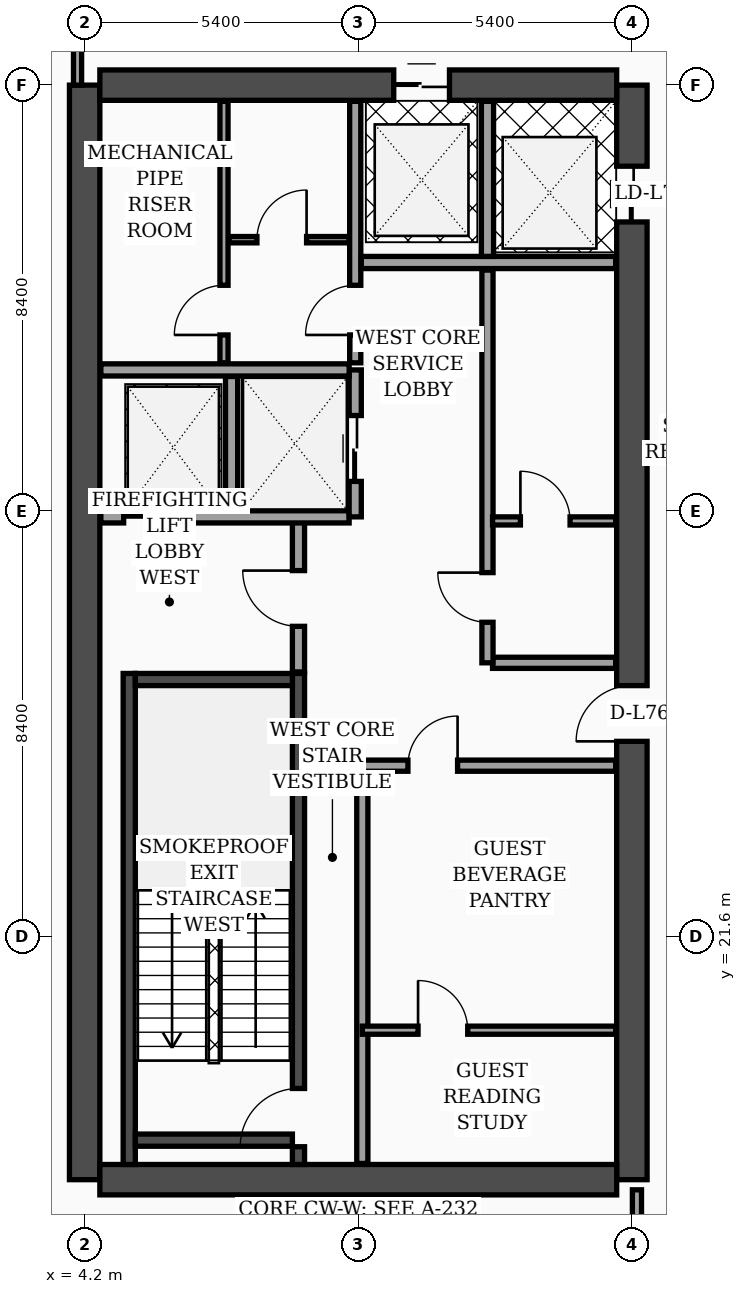
"""IFC4 building model, lengths in metres.
Left out: names, types, materials, properties, quantities, classifications, styles, units other than length and angle.
Written with IfcOpenShell. Run it as: python <this file> out.ifc"""

import sys

from ifc_helpers import new_model, si_unit, direction, frame, frame_2d, origin, place, context, subcontext, project, spatial, rectangle, extrude, element, fill, save


model = new_model("IFC4")
c1 = context("Model", 3, precision=1e-05, world=origin(), true_north=direction((0.0, 1.0)))
c2 = subcontext(c1, "Body", "Model", "MODEL_VIEW")
j1 = project(units=[si_unit("LENGTHUNIT", "METRE"), si_unit("PLANEANGLEUNIT", "RADIAN")], contexts=[c1])
p1 = place(None, origin())
s1 = spatial("IfcSite", under=j1, at=p1, CompositionType="ELEMENT")
p2 = place(p1, origin())
s2 = spatial("IfcBuilding", under=s1, at=p2, CompositionType="ELEMENT")
p3 = place(p2, frame((0.0, 0.0, 307.0)))
s3 = spatial("IfcBuildingStorey", under=s2, at=p3, CompositionType="ELEMENT", Elevation=307.0)
p4 = place(p3, frame((4.2, 16.8, 0.0), z_axis=(0.0, 0.0, 1.0), x_axis=(0.0, 1.0, 0.0)))
e1 = element("IfcWall", 1, at=p4, inside=s3, PredefinedType="SHEAR", context=c2, shape_type="SweptSolid", body=[
    extrude(rectangle(XDim=21.6, YDim=0.6, at=frame_2d((10.8, 0.0))), origin(), (0.0, 0.0, 1.0), 4.26),
])
p5 = place(p3, frame((15.0, 16.8, 0.0), z_axis=(0.0, 0.0, 1.0), x_axis=(0.0, 1.0, 0.0)))
e2 = element("IfcWall", 2, at=p5, inside=s3, PredefinedType="SHEAR", context=c2, shape_type="SweptSolid", body=[
    extrude(rectangle(XDim=21.6, YDim=0.6, at=frame_2d((10.8, 0.0))), origin(), (0.0, 0.0, 1.0), 4.26),
])
p6 = place(p5, frame((8.65, 0.0, 0.0)))
e3 = element("IfcOpeningElement", 3, at=p6, cuts=e2, PredefinedType="OPENING", context=c2, shape_type="SweptSolid", body=[
    extrude(rectangle(XDim=1.1, YDim=2.2, at=frame_2d((0.55, 1.1))), frame((0.0, 0.31, 0.0), z_axis=(0.0, -1.0, 0.0), x_axis=(1.0, 0.0, 0.0)), (0.0, 0.0, 1.0), 0.62),
])
p7 = place(p5, frame((18.9, 0.0, 0.0)))
e4 = element("IfcOpeningElement", 4, at=p7, cuts=e2, PredefinedType="OPENING", context=c2, shape_type="SweptSolid", body=[
    extrude(rectangle(XDim=1.1, YDim=2.2, at=frame_2d((0.55, 1.1))), frame((0.0, 0.31, 0.0), z_axis=(0.0, -1.0, 0.0), x_axis=(1.0, 0.0, 0.0)), (0.0, 0.0, 1.0), 0.62),
])
p8 = place(p3, frame((4.5, 38.4, 0.0), z_axis=(0.0, 0.0, 1.0), x_axis=(1.0, 0.0, 0.0)))
e5 = element("IfcWall", 5, at=p8, inside=s3, PredefinedType="SHEAR", context=c2, shape_type="SweptSolid", body=[
    extrude(rectangle(XDim=10.2, YDim=0.6, at=frame_2d((5.1, 0.0))), origin(), (0.0, 0.0, 1.0), 4.26),
])
p9 = place(p8, frame((5.8, 0.0, 0.0)))
e6 = element("IfcOpeningElement", 6, at=p9, cuts=e5, PredefinedType="OPENING", context=c2, shape_type="SweptSolid", body=[
    extrude(rectangle(XDim=1.1, YDim=2.2, at=frame_2d((0.55, 1.1))), frame((0.0, 0.31, 0.0), z_axis=(0.0, -1.0, 0.0), x_axis=(1.0, 0.0, 0.0)), (0.0, 0.0, 1.0), 0.62),
])
p10 = place(p3, frame((4.5, 16.8, 0.0), z_axis=(0.0, 0.0, 1.0), x_axis=(1.0, 0.0, 0.0)))
e7 = element("IfcWall", 7, at=p10, inside=s3, PredefinedType="SHEAR", context=c2, shape_type="SweptSolid", body=[
    extrude(rectangle(XDim=10.2, YDim=0.6, at=frame_2d((5.1, 0.0))), origin(), (0.0, 0.0, 1.0), 4.26),
])
p11 = place(p3, frame((5.08, 17.1, 0.0), z_axis=(0.0, 0.0, 1.0), x_axis=(0.0, 1.0, 0.0)))
e8 = element("IfcWall", 8, at=p11, inside=s3, PredefinedType="SOLIDWALL", context=c2, shape_type="SweptSolid", body=[
    extrude(rectangle(XDim=9.69, YDim=0.24, at=frame_2d((4.845, 0.0))), origin(), (0.0, 0.0, 1.0), 4.26),
])
p12 = place(p3, frame((8.42, 17.1, 0.0), z_axis=(0.0, 0.0, 1.0), x_axis=(0.0, 1.0, 0.0)))
e9 = element("IfcWall", 9, at=p12, inside=s3, PredefinedType="SOLIDWALL", context=c2, shape_type="SweptSolid", body=[
    extrude(rectangle(XDim=9.69, YDim=0.24, at=frame_2d((4.845, 0.0))), origin(), (0.0, 0.0, 1.0), 4.26),
])
p13 = place(p12, frame((0.35, 0.0, 0.0)))
e10 = element("IfcOpeningElement", 10, at=p13, cuts=e9, PredefinedType="OPENING", context=c2, shape_type="SweptSolid", body=[
    extrude(rectangle(XDim=1.15, YDim=2.2, at=frame_2d((0.575, 1.1))), frame((0.0, 0.13, 0.0), z_axis=(0.0, -1.0, 0.0), x_axis=(1.0, 0.0, 0.0)), (0.0, 0.0, 1.0), 0.26),
])
for number, where, z_axis, x_axis in (
    (11, (5.2, 17.58, 0.0), (0.0, 0.0, 1.0), (1.0, 0.0, 0.0)),
    (12, (5.2, 26.67, 0.0), (0.0, 0.0, 1.0), (1.0, 0.0, 0.0)),
):
    element("IfcWall", number, at=place(p3, frame(where, z_axis=z_axis, x_axis=x_axis)), inside=s3, PredefinedType="SOLIDWALL", context=c2, shape_type="SweptSolid", body=[
        extrude(rectangle(XDim=3.1, YDim=0.24, at=frame_2d((1.55, 0.0))), origin(), (0.0, 0.0, 1.0), 4.26),
    ])
p14 = place(p3, frame((8.42, 26.82, 0.0), z_axis=(0.0, 0.0, 1.0), x_axis=(0.0, 1.0, 0.0)))
e13 = element("IfcWall", 13, at=p14, inside=s3, PredefinedType="SOLIDWALL", context=c2, shape_type="SweptSolid", body=[
    extrude(rectangle(XDim=3.0, YDim=0.24, at=frame_2d((1.5, 0.0))), origin(), (0.0, 0.0, 1.0), 4.26),
])
p15 = place(p14, frame((0.9, 0.0, 0.0)))
e14 = element("IfcOpeningElement", 14, at=p15, cuts=e13, PredefinedType="OPENING", context=c2, shape_type="SweptSolid", body=[
    extrude(rectangle(XDim=1.1, YDim=2.2, at=frame_2d((0.55, 1.1))), frame((0.0, 0.13, 0.0), z_axis=(0.0, -1.0, 0.0), x_axis=(1.0, 0.0, 0.0)), (0.0, 0.0, 1.0), 0.26),
])
p16 = place(p3, frame((4.52, 29.88, 0.0), z_axis=(0.0, 0.0, 1.0), x_axis=(1.0, 0.0, 0.0)))
e15 = element("IfcWall", 15, at=p16, inside=s3, PredefinedType="SOLIDWALL", context=c2, shape_type="SweptSolid", body=[
    extrude(rectangle(XDim=4.9, YDim=0.24, at=frame_2d((2.45, 0.0))), origin(), (0.0, 0.0, 1.0), 4.26),
])
p17 = place(p16, frame((0.45, 0.0, 0.0)))
e16 = element("IfcOpeningElement", 16, at=p17, cuts=e15, PredefinedType="OPENING", context=c2, shape_type="SweptSolid", body=[
    extrude(rectangle(XDim=1.3, YDim=2.35, at=frame_2d((0.65, 1.175))), frame((0.0, 0.13, 0.0), z_axis=(0.0, -1.0, 0.0), x_axis=(1.0, 0.0, 0.0)), (0.0, 0.0, 1.0), 0.26),
])
p18 = place(p3, frame((7.1, 30.02, 0.0), z_axis=(0.0, 0.0, 1.0), x_axis=(0.0, 1.0, 0.0)))
e17 = element("IfcWall", 17, at=p18, inside=s3, PredefinedType="SOLIDWALL", context=c2, shape_type="SweptSolid", body=[
    extrude(rectangle(XDim=2.63, YDim=0.24, at=frame_2d((1.315, 0.0))), origin(), (0.0, 0.0, 1.0), 4.26),
])
p19 = place(p3, frame((9.54, 29.88, 0.0), z_axis=(0.0, 0.0, 1.0), x_axis=(0.0, 1.0, 0.0)))
e18 = element("IfcWall", 18, at=p19, inside=s3, PredefinedType="SOLIDWALL", context=c2, shape_type="SweptSolid", body=[
    extrude(rectangle(XDim=2.9, YDim=0.24, at=frame_2d((1.45, 0.0))), origin(), (0.0, 0.0, 1.0), 4.26),
])
p20 = place(p19, frame((0.7, 0.0, 0.0)))
e19 = element("IfcOpeningElement", 19, at=p20, cuts=e18, PredefinedType="OPENING", context=c2, shape_type="SweptSolid", body=[
    extrude(rectangle(XDim=1.3, YDim=2.35, at=frame_2d((0.65, 1.175))), frame((0.0, 0.13, 0.0), z_axis=(0.0, -1.0, 0.0), x_axis=(1.0, 0.0, 0.0)), (0.0, 0.0, 1.0), 0.26),
])
p21 = place(p3, frame((4.52, 32.78, 0.0), z_axis=(0.0, 0.0, 1.0), x_axis=(1.0, 0.0, 0.0)))
e20 = element("IfcWall", 20, at=p21, inside=s3, PredefinedType="SOLIDWALL", context=c2, shape_type="SweptSolid", body=[
    extrude(rectangle(XDim=4.9, YDim=0.24, at=frame_2d((2.45, 0.0))), origin(), (0.0, 0.0, 1.0), 3.89),
])
p22 = place(p3, frame((9.68, 17.12, 0.0), z_axis=(0.0, 0.0, 1.0), x_axis=(0.0, 1.0, 0.0)))
e21 = element("IfcWall", 21, at=p22, inside=s3, PredefinedType="SOLIDWALL", context=c2, shape_type="SweptSolid", body=[
    extrude(rectangle(XDim=7.88, YDim=0.22, at=frame_2d((3.94, 0.0))), origin(), (0.0, 0.0, 1.0), 4.26),
])
p23 = place(p3, frame((6.95, 32.92, 0.0), z_axis=(0.0, 0.0, 1.0), x_axis=(0.0, 1.0, 0.0)))
e22 = element("IfcWall", 22, at=p23, inside=s3, PredefinedType="PARTITIONING", context=c2, shape_type="SweptSolid", body=[
    extrude(rectangle(XDim=5.16, YDim=0.16, at=frame_2d((2.58, 0.0))), origin(), (0.0, 0.0, 1.0), 4.26),
])
p24 = place(p23, frame((0.55, 0.0, 0.0)))
e23 = element("IfcOpeningElement", 23, at=p24, cuts=e22, PredefinedType="OPENING", context=c2, shape_type="SweptSolid", body=[
    extrude(rectangle(XDim=0.98, YDim=2.15, at=frame_2d((0.49, 1.075))), frame((0.0, 0.09, 0.0), z_axis=(0.0, -1.0, 0.0), x_axis=(1.0, 0.0, 0.0)), (0.0, 0.0, 1.0), 0.18),
])
p25 = place(p3, frame((7.05, 35.35, 0.0), z_axis=(0.0, 0.0, 1.0), x_axis=(1.0, 0.0, 0.0)))
e24 = element("IfcWall", 24, at=p25, inside=s3, PredefinedType="PARTITIONING", context=c2, shape_type="SweptSolid", body=[
    extrude(rectangle(XDim=2.37, YDim=0.125, at=frame_2d((1.185, 0.0))), origin(), (0.0, 0.0, 1.0), 4.26),
])
p26 = place(p25, frame((0.55, 0.0, 0.0)))
e25 = element("IfcOpeningElement", 25, at=p26, cuts=e24, PredefinedType="OPENING", context=c2, shape_type="SweptSolid", body=[
    extrude(rectangle(XDim=0.98, YDim=2.15, at=frame_2d((0.49, 1.075))), frame((0.0, 0.073, 0.0), z_axis=(0.0, -1.0, 0.0), x_axis=(1.0, 0.0, 0.0)), (0.0, 0.0, 1.0), 0.145),
])
p27 = place(p3, frame((9.54, 32.92, 0.0), z_axis=(0.0, 0.0, 1.0), x_axis=(0.0, 1.0, 0.0)))
e26 = element("IfcWall", 26, at=p27, inside=s3, PredefinedType="SOLIDWALL", context=c2, shape_type="SweptSolid", body=[
    extrude(rectangle(XDim=5.16, YDim=0.22, at=frame_2d((2.58, 0.0))), origin(), (0.0, 0.0, 1.0), 4.26),
])
p28 = place(p27, frame((0.55, 0.0, 0.0)))
e27 = element("IfcOpeningElement", 27, at=p28, cuts=e26, PredefinedType="OPENING", context=c2, shape_type="SweptSolid", body=[
    extrude(rectangle(XDim=0.98, YDim=2.15, at=frame_2d((0.49, 1.075))), frame((0.0, 0.12, 0.0), z_axis=(0.0, -1.0, 0.0), x_axis=(1.0, 0.0, 0.0)), (0.0, 0.0, 1.0), 0.24),
])
p29 = place(p3, frame((9.68, 19.75, 0.0), z_axis=(0.0, 0.0, 1.0), x_axis=(1.0, 0.0, 0.0)))
e28 = element("IfcWall", 28, at=p29, inside=s3, PredefinedType="PARTITIONING", context=c2, shape_type="SweptSolid", body=[
    extrude(rectangle(XDim=5.0, YDim=0.16, at=frame_2d((2.5, 0.0))), origin(), (0.0, 0.0, 1.0), 4.26),
])
p30 = place(p29, frame((1.1, 0.0, 0.0)))
e29 = element("IfcOpeningElement", 29, at=p30, cuts=e28, PredefinedType="OPENING", context=c2, shape_type="SweptSolid", body=[
    extrude(rectangle(XDim=0.98, YDim=2.15, at=frame_2d((0.49, 1.075))), frame((0.0, 0.09, 0.0), z_axis=(0.0, -1.0, 0.0), x_axis=(1.0, 0.0, 0.0)), (0.0, 0.0, 1.0), 0.18),
])
p31 = place(p3, frame((9.68, 24.97, 0.0), z_axis=(0.0, 0.0, 1.0), x_axis=(1.0, 0.0, 0.0)))
e30 = element("IfcWall", 30, at=p31, inside=s3, PredefinedType="SOLIDWALL", context=c2, shape_type="SweptSolid", body=[
    extrude(rectangle(XDim=5.0, YDim=0.22, at=frame_2d((2.5, 0.0))), origin(), (0.0, 0.0, 1.0), 3.69),
])
p32 = place(p31, frame((0.9, 0.0, 0.0)))
e31 = element("IfcOpeningElement", 31, at=p32, cuts=e30, PredefinedType="OPENING", context=c2, shape_type="SweptSolid", body=[
    extrude(rectangle(XDim=0.98, YDim=2.15, at=frame_2d((0.49, 1.075))), frame((0.0, 0.12, 0.0), z_axis=(0.0, -1.0, 0.0), x_axis=(1.0, 0.0, 0.0)), (0.0, 0.0, 1.0), 0.24),
])
p33 = place(p3, frame((12.25, 27.0, 0.0), z_axis=(0.0, 0.0, 1.0), x_axis=(1.0, 0.0, 0.0)))
e32 = element("IfcWall", 32, at=p33, inside=s3, PredefinedType="SOLIDWALL", context=c2, shape_type="SweptSolid", body=[
    extrude(rectangle(XDim=2.43, YDim=0.22, at=frame_2d((1.215, 0.0))), origin(), (0.0, 0.0, 1.0), 4.26),
])
p34 = place(p3, frame((12.15, 27.0, 0.0), z_axis=(0.0, 0.0, 1.0), x_axis=(0.0, 1.0, 0.0)))
e33 = element("IfcWall", 33, at=p34, inside=s3, PredefinedType="SOLIDWALL", context=c2, shape_type="SweptSolid", body=[
    extrude(rectangle(XDim=7.75, YDim=0.22, at=frame_2d((3.875, 0.0))), origin(), (0.0, 0.0, 1.0), 4.26),
])
p35 = place(p34, frame((0.8, 0.0, 0.0)))
e34 = element("IfcOpeningElement", 34, at=p35, cuts=e33, PredefinedType="OPENING", context=c2, shape_type="SweptSolid", body=[
    extrude(rectangle(XDim=0.98, YDim=2.15, at=frame_2d((0.49, 1.075))), frame((0.0, 0.12, 0.0), z_axis=(0.0, -1.0, 0.0), x_axis=(1.0, 0.0, 0.0)), (0.0, 0.0, 1.0), 0.24),
])
p36 = place(p3, frame((12.25, 29.8, 0.0), z_axis=(0.0, 0.0, 1.0), x_axis=(1.0, 0.0, 0.0)))
e35 = element("IfcWall", 35, at=p36, inside=s3, PredefinedType="PARTITIONING", context=c2, shape_type="SweptSolid", body=[
    extrude(rectangle(XDim=2.43, YDim=0.16, at=frame_2d((1.215, 0.0))), origin(), (0.0, 0.0, 1.0), 4.26),
])
p37 = place(p36, frame((0.55, 0.0, 0.0)))
e36 = element("IfcOpeningElement", 36, at=p37, cuts=e35, PredefinedType="OPENING", context=c2, shape_type="SweptSolid", body=[
    extrude(rectangle(XDim=0.98, YDim=2.15, at=frame_2d((0.49, 1.075))), frame((0.0, 0.09, 0.0), z_axis=(0.0, -1.0, 0.0), x_axis=(1.0, 0.0, 0.0)), (0.0, 0.0, 1.0), 0.18),
])
p38 = place(p3, frame((9.66, 34.9, 0.0), z_axis=(0.0, 0.0, 1.0), x_axis=(1.0, 0.0, 0.0)))
e37 = element("IfcWall", 37, at=p38, inside=s3, PredefinedType="SOLIDWALL", context=c2, shape_type="SweptSolid", body=[
    extrude(rectangle(XDim=5.02, YDim=0.24, at=frame_2d((2.51, 0.0))), origin(), (0.0, 0.0, 1.0), 4.26),
])
p39 = place(p3, frame((12.15, 35.02, 0.0), z_axis=(0.0, 0.0, 1.0), x_axis=(0.0, 1.0, 0.0)))
e38 = element("IfcWall", 38, at=p39, inside=s3, PredefinedType="SOLIDWALL", context=c2, shape_type="SweptSolid", body=[
    extrude(rectangle(XDim=3.06, YDim=0.24, at=frame_2d((1.53, 0.0))), origin(), (0.0, 0.0, 1.0), 4.26),
])
p40 = place(p3, frame((4.06, 38.4, 0.0), z_axis=(0.0, 0.0, 1.0), x_axis=(0.0, 1.0, 0.0)))
e39 = element("IfcWall", 39, at=p40, inside=s3, PredefinedType="PARTITIONING", context=c2, shape_type="SweptSolid", body=[
    extrude(rectangle(XDim=5.5, YDim=0.16, at=frame_2d((2.75, 0.0))), origin(), (0.0, 0.0, 1.0), 3.69),
])
p41 = place(p40, frame((3.2, 0.0, 0.0)))
e40 = element("IfcOpeningElement", 40, at=p41, cuts=e39, PredefinedType="OPENING", context=c2, shape_type="SweptSolid", body=[
    extrude(rectangle(XDim=1.02, YDim=2.2, at=frame_2d((0.51, 1.1))), frame((0.0, 0.09, 0.0), z_axis=(0.0, -1.0, 0.0), x_axis=(1.0, 0.0, 0.0)), (0.0, 0.0, 1.0), 0.18),
])
p42 = place(p3, frame((15.1, 2.6, 0.0), z_axis=(0.0, 0.0, 1.0), x_axis=(0.0, 1.0, 0.0)))
e41 = element("IfcWall", 41, at=p42, inside=s3, PredefinedType="PARTITIONING", context=c2, shape_type="SweptSolid", body=[
    extrude(rectangle(XDim=14.0, YDim=0.18, at=frame_2d((7.0, 0.0))), origin(), (0.0, 0.0, 1.0), 3.29),
])
p43 = place(p42, frame((11.8, 0.0, 0.0)))
e42 = element("IfcOpeningElement", 42, at=p43, cuts=e41, PredefinedType="OPENING", context=c2, shape_type="SweptSolid", body=[
    extrude(rectangle(XDim=1.5, YDim=2.22, at=frame_2d((0.75, 1.11))), frame((0.0, 0.1, 0.0), z_axis=(0.0, -1.0, 0.0), x_axis=(1.0, 0.0, 0.0)), (0.0, 0.0, 1.0), 0.2),
])
p44 = place(p15, origin())
e43 = element("IfcDoor", 43, at=p44, inside=s3, OperationType="SINGLE_SWING_RIGHT", PredefinedType="DOOR", context=c2, shape_type="SweptSolid", body=[
    extrude(rectangle(XDim=1.1, YDim=2.2, at=frame_2d((0.55, 1.1))), frame((0.0, 0.025, 0.0), z_axis=(0.0, -1.0, 0.0), x_axis=(1.0, 0.0, 0.0)), (0.0, 0.0, 1.0), 0.05),
])
fill(e14, e43)
p45 = place(p17, origin())
e44 = element("IfcDoor", 44, at=p45, inside=s3, OperationType="DOUBLE_DOOR_SLIDING", PredefinedType="DOOR", context=c2, shape_type="SweptSolid", body=[
    extrude(rectangle(XDim=1.3, YDim=2.35, at=frame_2d((0.65, 1.175))), frame((0.0, 0.025, 0.0), z_axis=(0.0, -1.0, 0.0), x_axis=(1.0, 0.0, 0.0)), (0.0, 0.0, 1.0), 0.05),
])
fill(e16, e44)
p46 = place(p20, origin())
e45 = element("IfcDoor", 45, at=p46, inside=s3, OperationType="DOUBLE_DOOR_SLIDING", PredefinedType="DOOR", context=c2, shape_type="SweptSolid", body=[
    extrude(rectangle(XDim=1.3, YDim=2.35, at=frame_2d((0.65, 1.175))), frame((0.0, 0.025, 0.0), z_axis=(0.0, -1.0, 0.0), x_axis=(1.0, 0.0, 0.0)), (0.0, 0.0, 1.0), 0.05),
])
fill(e19, e45)
p47 = place(p24, origin())
e46 = element("IfcDoor", 46, at=p47, inside=s3, OperationType="SINGLE_SWING_LEFT", PredefinedType="DOOR", context=c2, shape_type="SweptSolid", body=[
    extrude(rectangle(XDim=0.98, YDim=2.15, at=frame_2d((0.49, 1.075))), frame((0.0, 0.025, 0.0), z_axis=(0.0, -1.0, 0.0), x_axis=(1.0, 0.0, 0.0)), (0.0, 0.0, 1.0), 0.05),
])
fill(e23, e46)
p48 = place(p26, origin())
e47 = element("IfcDoor", 47, at=p48, inside=s3, OperationType="SINGLE_SWING_RIGHT", PredefinedType="DOOR", context=c2, shape_type="SweptSolid", body=[
    extrude(rectangle(XDim=0.98, YDim=2.15, at=frame_2d((0.49, 1.075))), frame((0.0, 0.025, 0.0), z_axis=(0.0, -1.0, 0.0), x_axis=(1.0, 0.0, 0.0)), (0.0, 0.0, 1.0), 0.05),
])
fill(e25, e47)
p49 = place(p28, origin())
e48 = element("IfcDoor", 48, at=p49, inside=s3, OperationType="SINGLE_SWING_LEFT", PredefinedType="DOOR", context=c2, shape_type="SweptSolid", body=[
    extrude(rectangle(XDim=0.98, YDim=2.15, at=frame_2d((0.49, 1.075))), frame((0.0, 0.025, 0.0), z_axis=(0.0, -1.0, 0.0), x_axis=(1.0, 0.0, 0.0)), (0.0, 0.0, 1.0), 0.05),
])
fill(e27, e48)
p50 = place(p30, origin())
e49 = element("IfcDoor", 49, at=p50, inside=s3, OperationType="SINGLE_SWING_LEFT", PredefinedType="DOOR", context=c2, shape_type="SweptSolid", body=[
    extrude(rectangle(XDim=0.98, YDim=2.15, at=frame_2d((0.49, 1.075))), frame((0.0, 0.025, 0.0), z_axis=(0.0, -1.0, 0.0), x_axis=(1.0, 0.0, 0.0)), (0.0, 0.0, 1.0), 0.05),
])
fill(e29, e49)
p51 = place(p32, origin())
e50 = element("IfcDoor", 50, at=p51, inside=s3, OperationType="SINGLE_SWING_RIGHT", PredefinedType="DOOR", context=c2, shape_type="SweptSolid", body=[
    extrude(rectangle(XDim=0.98, YDim=2.15, at=frame_2d((0.49, 1.075))), frame((0.0, 0.025, 0.0), z_axis=(0.0, -1.0, 0.0), x_axis=(1.0, 0.0, 0.0)), (0.0, 0.0, 1.0), 0.05),
])
fill(e31, e50)
p52 = place(p35, origin())
e51 = element("IfcDoor", 51, at=p52, inside=s3, OperationType="SINGLE_SWING_RIGHT", PredefinedType="DOOR", context=c2, shape_type="SweptSolid", body=[
    extrude(rectangle(XDim=0.98, YDim=2.15, at=frame_2d((0.49, 1.075))), frame((0.0, 0.025, 0.0), z_axis=(0.0, -1.0, 0.0), x_axis=(1.0, 0.0, 0.0)), (0.0, 0.0, 1.0), 0.05),
])
fill(e34, e51)
p53 = place(p37, origin())
e52 = element("IfcDoor", 52, at=p53, inside=s3, OperationType="SINGLE_SWING_LEFT", PredefinedType="DOOR", context=c2, shape_type="SweptSolid", body=[
    extrude(rectangle(XDim=0.98, YDim=2.15, at=frame_2d((0.49, 1.075))), frame((0.0, 0.025, 0.0), z_axis=(0.0, -1.0, 0.0), x_axis=(1.0, 0.0, 0.0)), (0.0, 0.0, 1.0), 0.05),
])
fill(e36, e52)
p54 = place(p13, origin())
e53 = element("IfcDoor", 53, at=p54, inside=s3, OperationType="SINGLE_SWING_LEFT", PredefinedType="DOOR", context=c2, shape_type="SweptSolid", body=[
    extrude(rectangle(XDim=1.15, YDim=2.2, at=frame_2d((0.575, 1.1))), frame((0.0, 0.025, 0.0), z_axis=(0.0, -1.0, 0.0), x_axis=(1.0, 0.0, 0.0)), (0.0, 0.0, 1.0), 0.05),
])
fill(e10, e53)
p55 = place(p6, origin())
e54 = element("IfcDoor", 54, at=p55, inside=s3, OperationType="SINGLE_SWING_LEFT", PredefinedType="DOOR", context=c2, shape_type="SweptSolid", body=[
    extrude(rectangle(XDim=1.1, YDim=2.2, at=frame_2d((0.55, 1.1))), frame((0.0, 0.025, 0.0), z_axis=(0.0, -1.0, 0.0), x_axis=(1.0, 0.0, 0.0)), (0.0, 0.0, 1.0), 0.05),
])
fill(e3, e54)
p56 = place(p7, origin())
e55 = element("IfcDoor", 55, at=p56, inside=s3, OperationType="DOUBLE_DOOR_SLIDING", PredefinedType="DOOR", context=c2, shape_type="SweptSolid", body=[
    extrude(rectangle(XDim=1.1, YDim=2.2, at=frame_2d((0.55, 1.1))), frame((0.0, 0.025, 0.0), z_axis=(0.0, -1.0, 0.0), x_axis=(1.0, 0.0, 0.0)), (0.0, 0.0, 1.0), 0.05),
])
fill(e4, e55)
p57 = place(p9, origin())
e56 = element("IfcDoor", 56, at=p57, inside=s3, OperationType="DOUBLE_DOOR_SLIDING", PredefinedType="DOOR", context=c2, shape_type="SweptSolid", body=[
    extrude(rectangle(XDim=1.1, YDim=2.2, at=frame_2d((0.55, 1.1))), frame((0.0, 0.025, 0.0), z_axis=(0.0, -1.0, 0.0), x_axis=(1.0, 0.0, 0.0)), (0.0, 0.0, 1.0), 0.05),
])
fill(e6, e56)
save(model, sys.argv[1])
